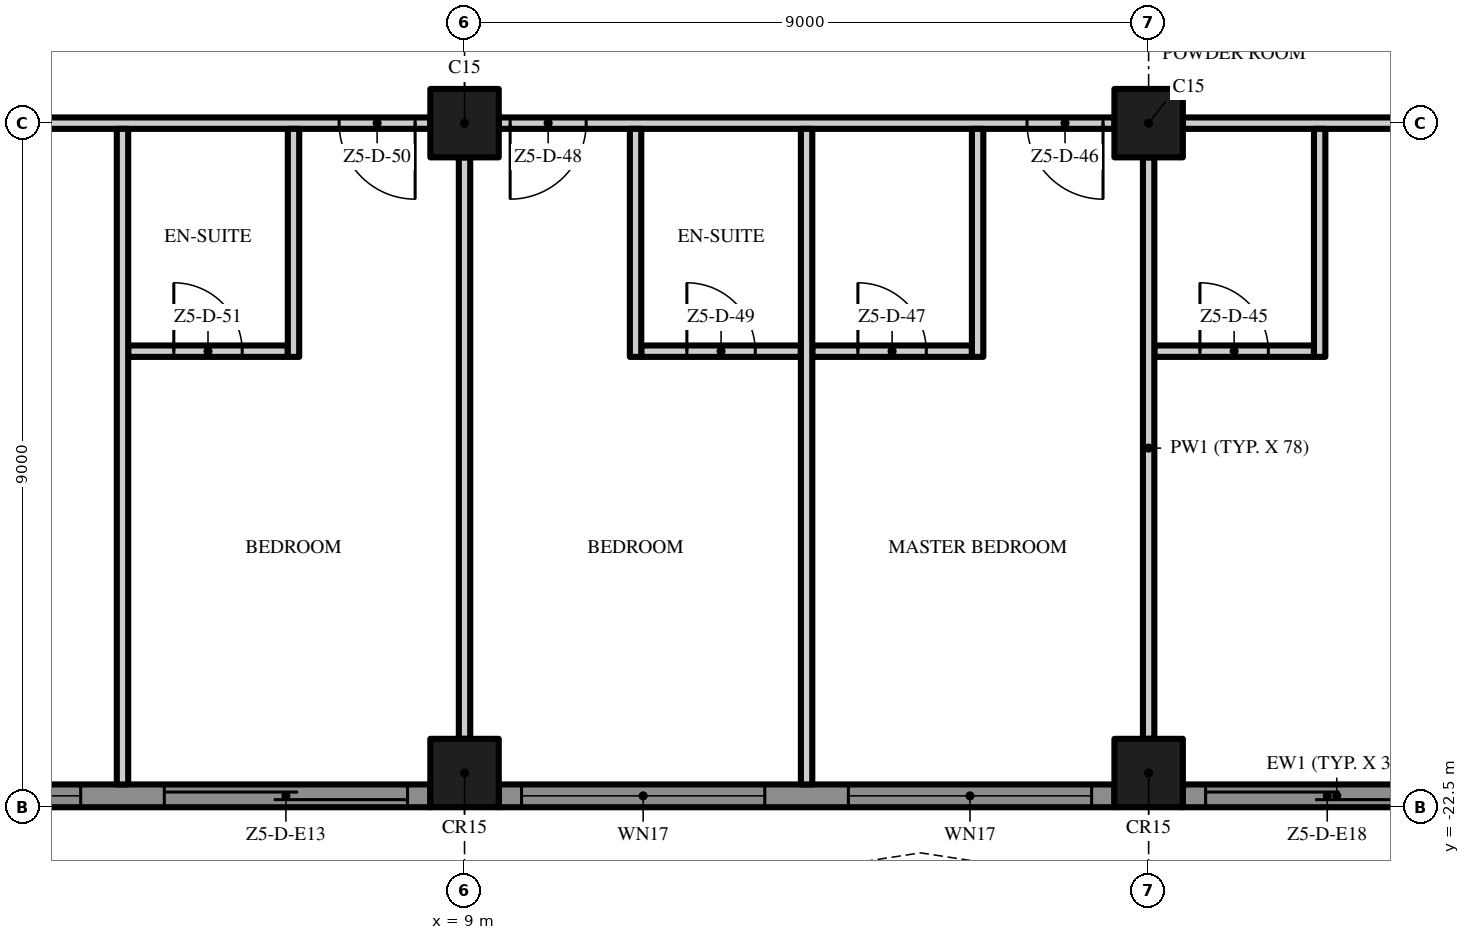
"""IFC4 building model, lengths in metres.
Left out: names, types, materials, properties, quantities, classifications, styles, units other than length and angle.
Written with IfcOpenShell. Run it as: python <this file> out.ifc"""

import sys

from ifc_helpers import new_model, si_unit, direction, frame, frame_2d, origin, origin_2d, place, context, subcontext, project, spatial, polyline, rectangle, outline, extrude, element, fill, save


model = new_model("IFC4")
c1 = context("Model", 3, precision=1e-05, world=origin(), true_north=direction((0.0, 1.0)))
c2 = subcontext(c1, "Body", "Model", "MODEL_VIEW")
j1 = project(units=[si_unit("LENGTHUNIT", "METRE"), si_unit("PLANEANGLEUNIT", "RADIAN")], contexts=[c1])
p1 = place(None, origin())
s1 = spatial("IfcSite", under=j1, at=p1, CompositionType="ELEMENT")
p2 = place(p1, origin())
s2 = spatial("IfcBuilding", under=s1, at=p2, CompositionType="ELEMENT")
p3 = place(p2, frame((0.0, 0.0, 280.6)))
s3 = spatial("IfcBuildingStorey", under=s2, at=p3, CompositionType="ELEMENT", Elevation=280.6)
for number, where, z_axis, x_axis in (
    (1, (18.0, -13.5, 0.0), (0.0, 0.0, 1.0), (1.0, 0.0, 0.0)),
    (2, (18.0, -22.05, 0.0), (0.0, 0.0, 1.0), (1.0, 0.0, 0.0)),
    (3, (9.0, -13.5, 0.0), (0.0, 0.0, 1.0), (1.0, 0.0, 0.0)),
    (4, (9.0, -22.05, 0.0), (0.0, 0.0, 1.0), (1.0, 0.0, 0.0)),
):
    element("IfcColumn", number, at=place(p3, frame(where, z_axis=z_axis, x_axis=x_axis)), inside=s3, PredefinedType="COLUMN", context=c2, shape_type="SweptSolid", body=[
        extrude(rectangle(XDim=0.9, YDim=0.9, at=origin_2d()), origin(), (0.0, 0.0, 1.0), 3.5),
    ])
p4 = place(p3, frame((8.55, -22.35, 0.0), z_axis=(0.0, 0.0, 1.0), x_axis=(-1.0, 0.0, 0.0)))
e5 = element("IfcWall", 5, at=p4, inside=s3, PredefinedType="SOLIDWALL", context=c2, shape_type="SweptSolid", body=[
    extrude(rectangle(XDim=8.1, YDim=0.3, at=frame_2d((4.05, 0.0))), origin(), (0.0, 0.0, 1.0), 3.5),
])
p5 = place(p4, frame((4.6, 0.0, 0.45)))
e6 = element("IfcOpeningElement", 6, at=p5, cuts=e5, PredefinedType="OPENING", context=c2, shape_type="SweptSolid", body=[
    extrude(rectangle(XDim=3.2, YDim=2.65, at=frame_2d((1.6, 1.325))), frame((0.0, 0.16, 0.0), z_axis=(0.0, -1.0, 0.0), x_axis=(1.0, 0.0, 0.0)), (0.0, 0.0, 1.0), 0.32),
])
p6 = place(p4, frame((0.3, 0.0, 0.0)))
e7 = element("IfcOpeningElement", 7, at=p6, cuts=e5, PredefinedType="OPENING", context=c2, shape_type="SweptSolid", body=[
    extrude(rectangle(XDim=3.2, YDim=2.4, at=frame_2d((1.6, 1.2))), frame((0.0, 0.16, 0.0), z_axis=(0.0, -1.0, 0.0), x_axis=(1.0, 0.0, 0.0)), (0.0, 0.0, 1.0), 0.32),
])
p7 = place(p3, frame((17.55, -22.35, 0.0), z_axis=(0.0, 0.0, 1.0), x_axis=(-1.0, 0.0, 0.0)))
e8 = element("IfcWall", 8, at=p7, inside=s3, PredefinedType="SOLIDWALL", context=c2, shape_type="SweptSolid", body=[
    extrude(rectangle(XDim=8.1, YDim=0.3, at=frame_2d((4.05, 0.0))), origin(), (0.0, 0.0, 1.0), 3.5),
])
p8 = place(p7, frame((4.6, 0.0, 0.45)))
e9 = element("IfcOpeningElement", 9, at=p8, cuts=e8, PredefinedType="OPENING", context=c2, shape_type="SweptSolid", body=[
    extrude(rectangle(XDim=3.2, YDim=2.65, at=frame_2d((1.6, 1.325))), frame((0.0, 0.16, 0.0), z_axis=(0.0, -1.0, 0.0), x_axis=(1.0, 0.0, 0.0)), (0.0, 0.0, 1.0), 0.32),
])
p9 = place(p7, frame((0.3, 0.0, 0.45)))
e10 = element("IfcOpeningElement", 10, at=p9, cuts=e8, PredefinedType="OPENING", context=c2, shape_type="SweptSolid", body=[
    extrude(rectangle(XDim=3.2, YDim=2.65, at=frame_2d((1.6, 1.325))), frame((0.0, 0.16, 0.0), z_axis=(0.0, -1.0, 0.0), x_axis=(1.0, 0.0, 0.0)), (0.0, 0.0, 1.0), 0.32),
])
p10 = place(p3, frame((22.5, -22.35, 0.0), z_axis=(0.0, 0.0, 1.0), x_axis=(-1.0, 0.0, 0.0)))
e11 = element("IfcWall", 11, at=p10, inside=s3, PredefinedType="SOLIDWALL", context=c2, shape_type="SweptSolid", body=[
    extrude(rectangle(XDim=4.05, YDim=0.3, at=frame_2d((2.025, 0.0))), origin(), (0.0, 0.0, 1.0), 3.5),
])
p11 = place(p10, frame((0.55, 0.0, 0.0)))
e12 = element("IfcOpeningElement", 12, at=p11, cuts=e11, PredefinedType="OPENING", context=c2, shape_type="SweptSolid", body=[
    extrude(rectangle(XDim=3.2, YDim=2.4, at=frame_2d((1.6, 1.2))), frame((0.0, 0.16, 0.0), z_axis=(0.0, -1.0, 0.0), x_axis=(1.0, 0.0, 0.0)), (0.0, 0.0, 1.0), 0.32),
])
p12 = place(p3, origin())
e13 = element("IfcWall", 13, at=p12, inside=s3, PredefinedType="USERDEFINED", context=c2, shape_type="SweptSolid", body=[
    extrude(outline(polyline([(-22.5, -25.5), (-21.0, -25.271), (-19.5, -24.671), (-18.0, -23.929), (-16.5, -23.329), (-15.0, -23.1), (-13.5, -23.329), (-12.0, -23.929), (-10.5, -24.671), (-9.0, -25.271), (-7.5, -25.5), (-6.0, -25.271), (-4.5, -24.671), (-3.0, -23.929), (-1.5, -23.329), (0.0, -23.1), (1.5, -23.329), (3.0, -23.929), (4.5, -24.671), (6.0, -25.271), (7.5, -25.5), (9.0, -25.271), (10.5, -24.671), (12.0, -23.929), (13.5, -23.329), (15.0, -23.1), (16.5, -23.329), (18.0, -23.929), (19.5, -24.671), (21.0, -25.271), (22.5, -25.5), (22.538, -25.253), (21.066, -25.028), (19.602, -24.442), (18.102, -23.701), (16.566, -23.086), (15.0, -22.847), (13.434, -23.086), (11.898, -23.701), (10.398, -24.442), (8.934, -25.028), (7.5, -25.247), (6.066, -25.028), (4.602, -24.442), (3.102, -23.701), (1.566, -23.086), (0.0, -22.847), (-1.566, -23.086), (-3.102, -23.701), (-4.602, -24.442), (-6.066, -25.028), (-7.5, -25.247), (-8.934, -25.028), (-10.398, -24.442), (-11.898, -23.701), (-13.434, -23.086), (-15.0, -22.847), (-16.566, -23.086), (-18.102, -23.701), (-19.602, -24.442), (-21.066, -25.028), (-22.538, -25.253), (-22.5, -25.5)])), origin(), (0.0, 0.0, 1.0), 0.9),
])
p13 = place(p3, frame((4.575, -16.5, 0.0), z_axis=(0.0, 0.0, 1.0), x_axis=(1.0, 0.0, 0.0)))
e14 = element("IfcWall", 14, at=p13, inside=s3, PredefinedType="PARTITIONING", context=c2, shape_type="SweptSolid", body=[
    extrude(rectangle(XDim=2.1, YDim=0.15, at=frame_2d((1.05, 0.0))), origin(), (0.0, 0.0, 1.0), 3.5),
])
p14 = place(p13, frame((0.6, 0.0, 0.0)))
e15 = element("IfcOpeningElement", 15, at=p14, cuts=e14, PredefinedType="OPENING", context=c2, shape_type="SweptSolid", body=[
    extrude(rectangle(XDim=0.9, YDim=2.1, at=frame_2d((0.45, 1.05))), frame((0.0, 0.085, 0.0), z_axis=(0.0, -1.0, 0.0), x_axis=(1.0, 0.0, 0.0)), (0.0, 0.0, 1.0), 0.17),
])
p15 = place(p3, frame((11.325, -16.5, 0.0), z_axis=(0.0, 0.0, 1.0), x_axis=(1.0, 0.0, 0.0)))
e16 = element("IfcWall", 16, at=p15, inside=s3, PredefinedType="PARTITIONING", context=c2, shape_type="SweptSolid", body=[
    extrude(rectangle(XDim=2.1, YDim=0.15, at=frame_2d((1.05, 0.0))), origin(), (0.0, 0.0, 1.0), 3.5),
])
p16 = place(p15, frame((0.6, 0.0, 0.0)))
e17 = element("IfcOpeningElement", 17, at=p16, cuts=e16, PredefinedType="OPENING", context=c2, shape_type="SweptSolid", body=[
    extrude(rectangle(XDim=0.9, YDim=2.1, at=frame_2d((0.45, 1.05))), frame((0.0, 0.085, 0.0), z_axis=(0.0, -1.0, 0.0), x_axis=(1.0, 0.0, 0.0)), (0.0, 0.0, 1.0), 0.17),
])
p17 = place(p3, frame((13.575, -16.5, 0.0), z_axis=(0.0, 0.0, 1.0), x_axis=(1.0, 0.0, 0.0)))
e18 = element("IfcWall", 18, at=p17, inside=s3, PredefinedType="PARTITIONING", context=c2, shape_type="SweptSolid", body=[
    extrude(rectangle(XDim=2.1, YDim=0.15, at=frame_2d((1.05, 0.0))), origin(), (0.0, 0.0, 1.0), 3.5),
])
p18 = place(p17, frame((0.6, 0.0, 0.0)))
e19 = element("IfcOpeningElement", 19, at=p18, cuts=e18, PredefinedType="OPENING", context=c2, shape_type="SweptSolid", body=[
    extrude(rectangle(XDim=0.9, YDim=2.1, at=frame_2d((0.45, 1.05))), frame((0.0, 0.085, 0.0), z_axis=(0.0, -1.0, 0.0), x_axis=(1.0, 0.0, 0.0)), (0.0, 0.0, 1.0), 0.17),
])
p19 = place(p3, frame((18.075, -16.5, 0.0), z_axis=(0.0, 0.0, 1.0), x_axis=(1.0, 0.0, 0.0)))
e20 = element("IfcWall", 20, at=p19, inside=s3, PredefinedType="PARTITIONING", context=c2, shape_type="SweptSolid", body=[
    extrude(rectangle(XDim=2.1, YDim=0.15, at=frame_2d((1.05, 0.0))), origin(), (0.0, 0.0, 1.0), 3.5),
])
p20 = place(p19, frame((0.6, 0.0, 0.0)))
e21 = element("IfcOpeningElement", 21, at=p20, cuts=e20, PredefinedType="OPENING", context=c2, shape_type="SweptSolid", body=[
    extrude(rectangle(XDim=0.9, YDim=2.1, at=frame_2d((0.45, 1.05))), frame((0.0, 0.085, 0.0), z_axis=(0.0, -1.0, 0.0), x_axis=(1.0, 0.0, 0.0)), (0.0, 0.0, 1.0), 0.17),
])
p21 = place(p3, frame((8.55, -13.5, 0.0), z_axis=(0.0, 0.0, 1.0), x_axis=(-1.0, 0.0, 0.0)))
e22 = element("IfcWall", 22, at=p21, inside=s3, PredefinedType="PARTITIONING", context=c2, shape_type="SweptSolid", body=[
    extrude(rectangle(XDim=8.1, YDim=0.15, at=frame_2d((4.05, 0.0))), origin(), (0.0, 0.0, 1.0), 3.5),
])
p22 = place(p21, frame((0.2, 0.0, 0.0)))
e23 = element("IfcOpeningElement", 23, at=p22, cuts=e22, PredefinedType="OPENING", context=c2, shape_type="SweptSolid", body=[
    extrude(rectangle(XDim=1.0, YDim=2.4, at=frame_2d((0.5, 1.2))), frame((0.0, 0.085, 0.0), z_axis=(0.0, -1.0, 0.0), x_axis=(1.0, 0.0, 0.0)), (0.0, 0.0, 1.0), 0.17),
])
p23 = place(p21, frame((5.8, 0.0, 0.0)))
e24 = element("IfcOpeningElement", 24, at=p23, cuts=e22, PredefinedType="OPENING", context=c2, shape_type="SweptSolid", body=[
    extrude(rectangle(XDim=1.0, YDim=2.4, at=frame_2d((0.5, 1.2))), frame((0.0, 0.085, 0.0), z_axis=(0.0, -1.0, 0.0), x_axis=(1.0, 0.0, 0.0)), (0.0, 0.0, 1.0), 0.17),
])
p24 = place(p3, frame((17.55, -13.5, 0.0), z_axis=(0.0, 0.0, 1.0), x_axis=(-1.0, 0.0, 0.0)))
e25 = element("IfcWall", 25, at=p24, inside=s3, PredefinedType="PARTITIONING", context=c2, shape_type="SweptSolid", body=[
    extrude(rectangle(XDim=8.1, YDim=0.15, at=frame_2d((4.05, 0.0))), origin(), (0.0, 0.0, 1.0), 3.5),
])
p25 = place(p24, frame((0.15, 0.0, 0.0)))
e26 = element("IfcOpeningElement", 26, at=p25, cuts=e25, PredefinedType="OPENING", context=c2, shape_type="SweptSolid", body=[
    extrude(rectangle(XDim=1.0, YDim=2.4, at=frame_2d((0.5, 1.2))), frame((0.0, 0.085, 0.0), z_axis=(0.0, -1.0, 0.0), x_axis=(1.0, 0.0, 0.0)), (0.0, 0.0, 1.0), 0.17),
])
p26 = place(p24, frame((6.95, 0.0, 0.0)))
e27 = element("IfcOpeningElement", 27, at=p26, cuts=e25, PredefinedType="OPENING", context=c2, shape_type="SweptSolid", body=[
    extrude(rectangle(XDim=1.0, YDim=2.4, at=frame_2d((0.5, 1.2))), frame((0.0, 0.085, 0.0), z_axis=(0.0, -1.0, 0.0), x_axis=(1.0, 0.0, 0.0)), (0.0, 0.0, 1.0), 0.17),
])
p27 = place(p3, frame((26.1, -13.5, 0.0), z_axis=(0.0, 0.0, 1.0), x_axis=(-1.0, 0.0, 0.0)))
e28 = element("IfcWall", 28, at=p27, inside=s3, PredefinedType="PARTITIONING", context=c2, shape_type="SweptSolid", body=[
    extrude(rectangle(XDim=7.65, YDim=0.15, at=frame_2d((3.825, 0.0))), origin(), (0.0, 0.0, 1.0), 3.5),
])
p28 = place(p27, frame((1.6, 0.0, 0.0)))
e29 = element("IfcOpeningElement", 29, at=p28, cuts=e28, PredefinedType="OPENING", context=c2, shape_type="SweptSolid", body=[
    extrude(rectangle(XDim=1.8, YDim=2.4, at=frame_2d((0.9, 1.2))), frame((0.0, 0.085, 0.0), z_axis=(0.0, -1.0, 0.0), x_axis=(1.0, 0.0, 0.0)), (0.0, 0.0, 1.0), 0.17),
])
p29 = place(p3, frame((4.5, -22.2, 0.0), z_axis=(0.0, 0.0, 1.0), x_axis=(0.0, 1.0, 0.0)))
e30 = element("IfcWall", 30, at=p29, inside=s3, PredefinedType="PARTITIONING", context=c2, shape_type="SweptSolid", body=[
    extrude(rectangle(XDim=8.625, YDim=0.15, at=frame_2d((4.312, 0.0))), origin(), (0.0, 0.0, 1.0), 3.5),
])
p30 = place(p3, frame((6.75, -16.575, 0.0), z_axis=(0.0, 0.0, 1.0), x_axis=(0.0, 1.0, 0.0)))
e31 = element("IfcWall", 31, at=p30, inside=s3, PredefinedType="PARTITIONING", context=c2, shape_type="SweptSolid", body=[
    extrude(rectangle(XDim=3.0, YDim=0.15, at=frame_2d((1.5, 0.0))), origin(), (0.0, 0.0, 1.0), 3.5),
])
p31 = place(p3, frame((9.0, -21.6, 0.0), z_axis=(0.0, 0.0, 1.0), x_axis=(0.0, 1.0, 0.0)))
e32 = element("IfcWall", 32, at=p31, inside=s3, PredefinedType="PARTITIONING", context=c2, shape_type="SweptSolid", body=[
    extrude(rectangle(XDim=7.65, YDim=0.15, at=frame_2d((3.825, 0.0))), origin(), (0.0, 0.0, 1.0), 3.5),
])
p32 = place(p3, frame((11.25, -16.575, 0.0), z_axis=(0.0, 0.0, 1.0), x_axis=(0.0, 1.0, 0.0)))
e33 = element("IfcWall", 33, at=p32, inside=s3, PredefinedType="PARTITIONING", context=c2, shape_type="SweptSolid", body=[
    extrude(rectangle(XDim=3.0, YDim=0.15, at=frame_2d((1.5, 0.0))), origin(), (0.0, 0.0, 1.0), 3.5),
])
p33 = place(p3, frame((13.5, -22.2, 0.0), z_axis=(0.0, 0.0, 1.0), x_axis=(0.0, 1.0, 0.0)))
e34 = element("IfcWall", 34, at=p33, inside=s3, PredefinedType="PARTITIONING", context=c2, shape_type="SweptSolid", body=[
    extrude(rectangle(XDim=8.625, YDim=0.15, at=frame_2d((4.312, 0.0))), origin(), (0.0, 0.0, 1.0), 3.5),
])
p34 = place(p3, frame((15.75, -16.575, 0.0), z_axis=(0.0, 0.0, 1.0), x_axis=(0.0, 1.0, 0.0)))
e35 = element("IfcWall", 35, at=p34, inside=s3, PredefinedType="PARTITIONING", context=c2, shape_type="SweptSolid", body=[
    extrude(rectangle(XDim=3.0, YDim=0.15, at=frame_2d((1.5, 0.0))), origin(), (0.0, 0.0, 1.0), 3.5),
])
p35 = place(p3, frame((18.0, -21.6, 0.0), z_axis=(0.0, 0.0, 1.0), x_axis=(0.0, 1.0, 0.0)))
e36 = element("IfcWall", 36, at=p35, inside=s3, PredefinedType="PARTITIONING", context=c2, shape_type="SweptSolid", body=[
    extrude(rectangle(XDim=7.65, YDim=0.15, at=frame_2d((3.825, 0.0))), origin(), (0.0, 0.0, 1.0), 3.5),
])
p36 = place(p3, frame((20.25, -16.575, 0.0), z_axis=(0.0, 0.0, 1.0), x_axis=(0.0, 1.0, 0.0)))
e37 = element("IfcWall", 37, at=p36, inside=s3, PredefinedType="PARTITIONING", context=c2, shape_type="SweptSolid", body=[
    extrude(rectangle(XDim=3.0, YDim=0.15, at=frame_2d((1.5, 0.0))), origin(), (0.0, 0.0, 1.0), 3.5),
])
p37 = place(p5, origin())
e38 = element("IfcWindow", 38, at=p37, inside=s3, PartitioningType="SINGLE_PANEL", PredefinedType="WINDOW", context=c2, shape_type="SweptSolid", body=[
    extrude(rectangle(XDim=3.2, YDim=2.65, at=frame_2d((1.6, 1.325))), frame((0.0, 0.03, 0.0), z_axis=(0.0, -1.0, 0.0), x_axis=(1.0, 0.0, 0.0)), (0.0, 0.0, 1.0), 0.06),
])
fill(e6, e38)
p38 = place(p6, origin())
e39 = element("IfcDoor", 39, at=p38, inside=s3, OperationType="SINGLE_SWING_LEFT", PredefinedType="DOOR", context=c2, shape_type="SweptSolid", body=[
    extrude(rectangle(XDim=3.2, YDim=2.4, at=frame_2d((1.6, 1.2))), frame((0.0, 0.025, 0.0), z_axis=(0.0, -1.0, 0.0), x_axis=(1.0, 0.0, 0.0)), (0.0, 0.0, 1.0), 0.05),
])
fill(e7, e39)
p39 = place(p8, origin())
e40 = element("IfcWindow", 40, at=p39, inside=s3, PartitioningType="SINGLE_PANEL", PredefinedType="WINDOW", context=c2, shape_type="SweptSolid", body=[
    extrude(rectangle(XDim=3.2, YDim=2.65, at=frame_2d((1.6, 1.325))), frame((0.0, 0.03, 0.0), z_axis=(0.0, -1.0, 0.0), x_axis=(1.0, 0.0, 0.0)), (0.0, 0.0, 1.0), 0.06),
])
fill(e9, e40)
p40 = place(p9, origin())
e41 = element("IfcWindow", 41, at=p40, inside=s3, PartitioningType="SINGLE_PANEL", PredefinedType="WINDOW", context=c2, shape_type="SweptSolid", body=[
    extrude(rectangle(XDim=3.2, YDim=2.65, at=frame_2d((1.6, 1.325))), frame((0.0, 0.03, 0.0), z_axis=(0.0, -1.0, 0.0), x_axis=(1.0, 0.0, 0.0)), (0.0, 0.0, 1.0), 0.06),
])
fill(e10, e41)
p41 = place(p11, origin())
e42 = element("IfcDoor", 42, at=p41, inside=s3, OperationType="SINGLE_SWING_LEFT", PredefinedType="DOOR", context=c2, shape_type="SweptSolid", body=[
    extrude(rectangle(XDim=3.2, YDim=2.4, at=frame_2d((1.6, 1.2))), frame((0.0, 0.025, 0.0), z_axis=(0.0, -1.0, 0.0), x_axis=(1.0, 0.0, 0.0)), (0.0, 0.0, 1.0), 0.05),
])
fill(e12, e42)
p42 = place(p20, origin())
e43 = element("IfcDoor", 43, at=p42, inside=s3, OperationType="SINGLE_SWING_LEFT", PredefinedType="DOOR", context=c2, shape_type="SweptSolid", body=[
    extrude(rectangle(XDim=0.9, YDim=2.1, at=frame_2d((0.45, 1.05))), frame((0.0, 0.025, 0.0), z_axis=(0.0, -1.0, 0.0), x_axis=(1.0, 0.0, 0.0)), (0.0, 0.0, 1.0), 0.05),
])
fill(e21, e43)
p43 = place(p25, origin())
e44 = element("IfcDoor", 44, at=p43, inside=s3, OperationType="SINGLE_SWING_LEFT", PredefinedType="DOOR", context=c2, shape_type="SweptSolid", body=[
    extrude(rectangle(XDim=1.0, YDim=2.4, at=frame_2d((0.5, 1.2))), frame((0.0, 0.025, 0.0), z_axis=(0.0, -1.0, 0.0), x_axis=(1.0, 0.0, 0.0)), (0.0, 0.0, 1.0), 0.05),
])
fill(e26, e44)
p44 = place(p18, origin())
e45 = element("IfcDoor", 45, at=p44, inside=s3, OperationType="SINGLE_SWING_LEFT", PredefinedType="DOOR", context=c2, shape_type="SweptSolid", body=[
    extrude(rectangle(XDim=0.9, YDim=2.1, at=frame_2d((0.45, 1.05))), frame((0.0, 0.025, 0.0), z_axis=(0.0, -1.0, 0.0), x_axis=(1.0, 0.0, 0.0)), (0.0, 0.0, 1.0), 0.05),
])
fill(e19, e45)
p45 = place(p26, origin())
e46 = element("IfcDoor", 46, at=p45, inside=s3, OperationType="SINGLE_SWING_RIGHT", PredefinedType="DOOR", context=c2, shape_type="SweptSolid", body=[
    extrude(rectangle(XDim=1.0, YDim=2.4, at=frame_2d((0.5, 1.2))), frame((0.0, 0.025, 0.0), z_axis=(0.0, -1.0, 0.0), x_axis=(1.0, 0.0, 0.0)), (0.0, 0.0, 1.0), 0.05),
])
fill(e27, e46)
p46 = place(p16, origin())
e47 = element("IfcDoor", 47, at=p46, inside=s3, OperationType="SINGLE_SWING_LEFT", PredefinedType="DOOR", context=c2, shape_type="SweptSolid", body=[
    extrude(rectangle(XDim=0.9, YDim=2.1, at=frame_2d((0.45, 1.05))), frame((0.0, 0.025, 0.0), z_axis=(0.0, -1.0, 0.0), x_axis=(1.0, 0.0, 0.0)), (0.0, 0.0, 1.0), 0.05),
])
fill(e17, e47)
p47 = place(p22, origin())
e48 = element("IfcDoor", 48, at=p47, inside=s3, OperationType="SINGLE_SWING_LEFT", PredefinedType="DOOR", context=c2, shape_type="SweptSolid", body=[
    extrude(rectangle(XDim=1.0, YDim=2.4, at=frame_2d((0.5, 1.2))), frame((0.0, 0.025, 0.0), z_axis=(0.0, -1.0, 0.0), x_axis=(1.0, 0.0, 0.0)), (0.0, 0.0, 1.0), 0.05),
])
fill(e23, e48)
p48 = place(p14, origin())
e49 = element("IfcDoor", 49, at=p48, inside=s3, OperationType="SINGLE_SWING_LEFT", PredefinedType="DOOR", context=c2, shape_type="SweptSolid", body=[
    extrude(rectangle(XDim=0.9, YDim=2.1, at=frame_2d((0.45, 1.05))), frame((0.0, 0.025, 0.0), z_axis=(0.0, -1.0, 0.0), x_axis=(1.0, 0.0, 0.0)), (0.0, 0.0, 1.0), 0.05),
])
fill(e15, e49)
save(model, sys.argv[1])
